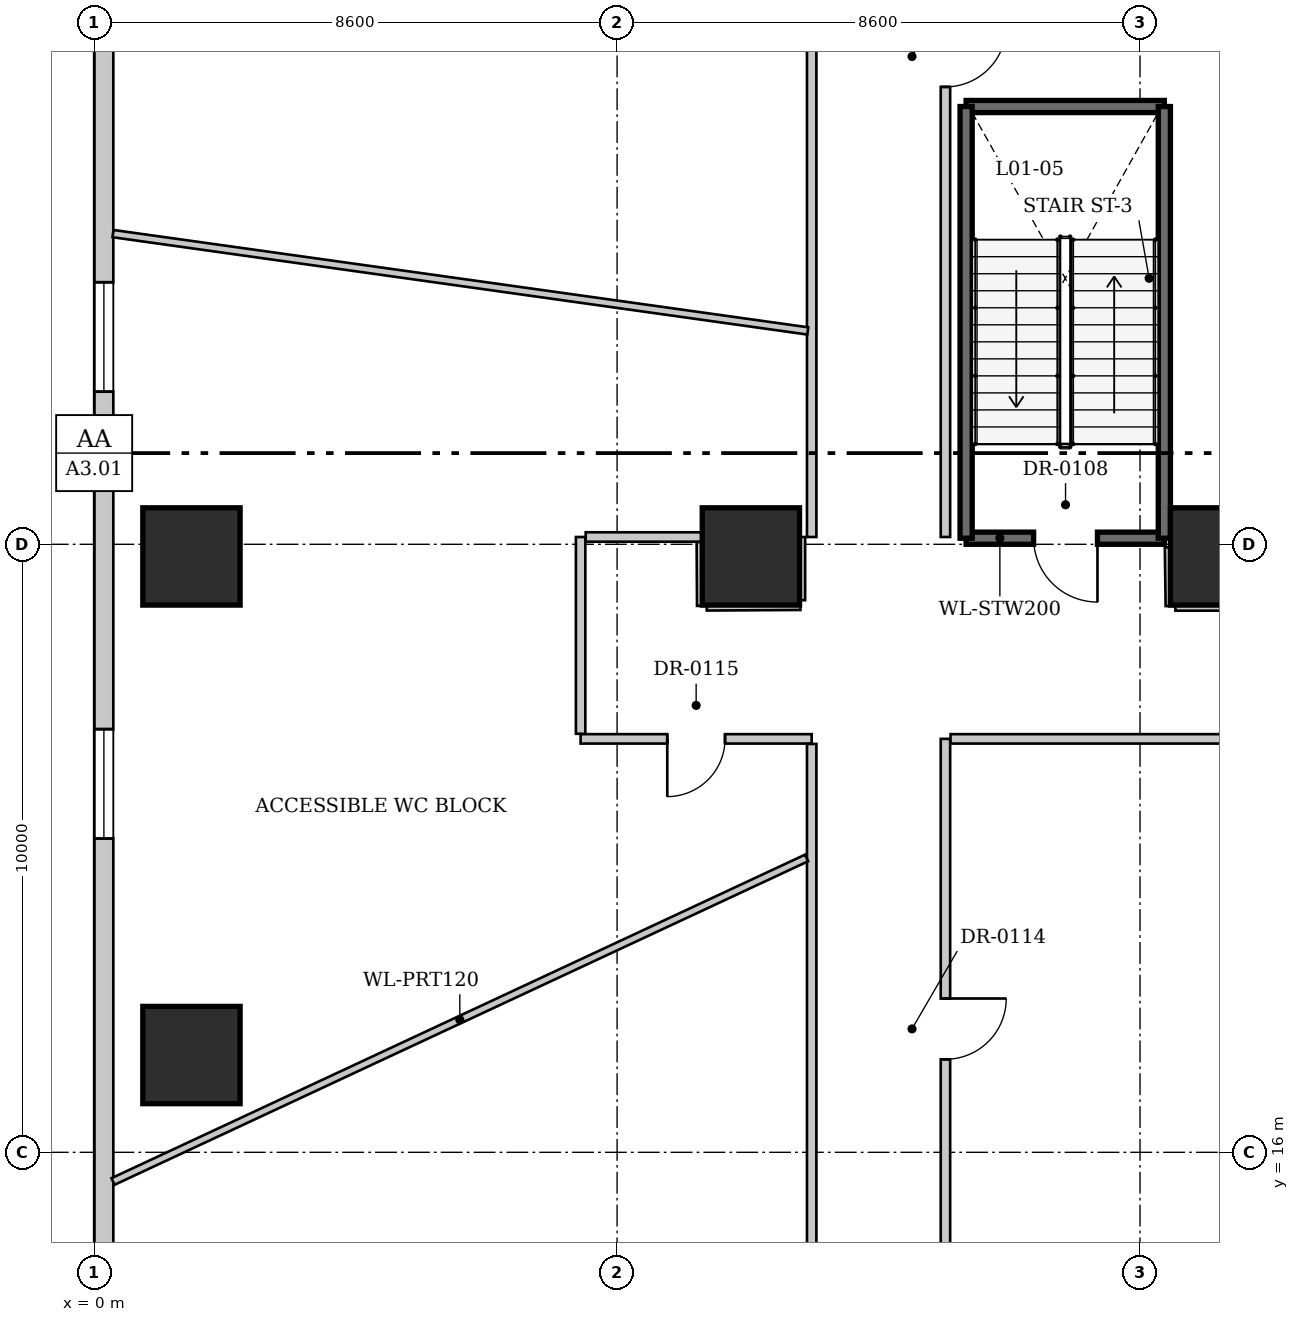
"""IFC4 building model, lengths in metres.
Left out: names, types, materials, properties, quantities, classifications, styles, units other than length and angle.
Written with IfcOpenShell. Run it as: python <this file> out.ifc"""

import sys

from ifc_helpers import new_model, si_unit, direction, frame, frame_2d, origin, origin_2d, place, context, subcontext, project, spatial, rectangle, extrude, source, transform, mapped, element, fill, save


model = new_model("IFC4")
c1 = context("Model", 3, precision=1e-05, world=origin(), true_north=direction((0.0, 1.0)))
c2 = subcontext(c1, "Body", "Model", "MODEL_VIEW")
j1 = project(units=[si_unit("LENGTHUNIT", "METRE"), si_unit("PLANEANGLEUNIT", "RADIAN")], contexts=[c1])
p1 = place(None, origin())
s1 = spatial("IfcSite", under=j1, at=p1, CompositionType="ELEMENT")
p2 = place(p1, origin())
s2 = spatial("IfcBuilding", under=s1, at=p2, CompositionType="ELEMENT")
p3 = place(p2, frame((0.0, 0.0, 5.2)))
s3 = spatial("IfcBuildingStorey", under=s2, at=p3, CompositionType="ELEMENT", Elevation=5.2)
for number, where, z_axis, x_axis in (
    (1, (1.6, 17.6, 0.0), (0.0, 0.0, 1.0), (1.0, 0.0, 0.0)),
    (2, (1.6, 25.8, 0.0), (0.0, 0.0, 1.0), (1.0, 0.0, 0.0)),
    (3, (10.8, 25.8, 0.0), (0.0, 0.0, 1.0), (1.0, 0.0, 0.0)),
    (4, (18.5, 25.8, 0.0), (0.0, 0.0, 1.0), (1.0, 0.0, 0.0)),
):
    element("IfcColumn", number, at=place(p3, frame(where, z_axis=z_axis, x_axis=x_axis)), inside=s3, PredefinedType="COLUMN", context=c2, shape_type="SweptSolid", body=[
        extrude(rectangle(XDim=1.6, YDim=1.6, at=origin_2d()), origin(), (0.0, 0.0, 1.0), 4.3),
    ])
p4 = place(p3, frame((0.16, 8.16, 0.0), z_axis=(0.0, 0.0, 1.0), x_axis=(0.0, 1.0, 0.0)))
e5 = element("IfcWall", 5, at=p4, inside=s3, PredefinedType="SOLIDWALL", context=c2, shape_type="SweptSolid", body=[
    extrude(rectangle(XDim=39.68, YDim=0.31, at=frame_2d((19.84, 0.0))), origin(), (0.0, 0.0, 1.0), 4.05),
])
p5 = place(p4, frame((4.45, 0.0, 0.95)))
e6 = element("IfcOpeningElement", 6, at=p5, cuts=e5, PredefinedType="OPENING", context=c2, shape_type="SweptSolid", body=[
    extrude(rectangle(XDim=1.8, YDim=2.4, at=frame_2d((0.9, 1.2))), frame((0.0, 0.165, 0.0), z_axis=(0.0, -1.0, 0.0), x_axis=(1.0, 0.0, 0.0)), (0.0, 0.0, 1.0), 0.33),
])
p6 = place(p4, frame((13.0, 0.0, 0.95)))
e7 = element("IfcOpeningElement", 7, at=p6, cuts=e5, PredefinedType="OPENING", context=c2, shape_type="SweptSolid", body=[
    extrude(rectangle(XDim=1.8, YDim=2.4, at=frame_2d((0.9, 1.2))), frame((0.0, 0.165, 0.0), z_axis=(0.0, -1.0, 0.0), x_axis=(1.0, 0.0, 0.0)), (0.0, 0.0, 1.0), 0.33),
])
p7 = place(p4, frame((20.35, 0.0, 0.95)))
e8 = element("IfcOpeningElement", 8, at=p7, cuts=e5, PredefinedType="OPENING", context=c2, shape_type="SweptSolid", body=[
    extrude(rectangle(XDim=1.8, YDim=2.4, at=frame_2d((0.9, 1.2))), frame((0.0, 0.165, 0.0), z_axis=(0.0, -1.0, 0.0), x_axis=(1.0, 0.0, 0.0)), (0.0, 0.0, 1.0), 0.33),
])
p8 = place(p4, frame((31.0, 0.0, 0.95)))
e9 = element("IfcOpeningElement", 9, at=p8, cuts=e5, PredefinedType="OPENING", context=c2, shape_type="SweptSolid", body=[
    extrude(rectangle(XDim=1.8, YDim=2.4, at=frame_2d((0.9, 1.2))), frame((0.0, 0.165, 0.0), z_axis=(0.0, -1.0, 0.0), x_axis=(1.0, 0.0, 0.0)), (0.0, 0.0, 1.0), 0.33),
])
p9 = place(p3, frame((17.6, 26.1, 0.0), z_axis=(0.0, 0.0, 1.0), x_axis=(-1.0, 0.0, 0.0)))
e10 = element("IfcWall", 10, at=p9, inside=s3, PredefinedType="SHEAR", context=c2, shape_type="SweptSolid", body=[
    extrude(rectangle(XDim=3.26, YDim=0.2, at=frame_2d((1.63, 0.0))), origin(), (0.0, 0.0, 1.0), 4.6),
])
p10 = place(p9, frame((1.1, 0.0, 0.0)))
e11 = element("IfcOpeningElement", 11, at=p10, cuts=e10, PredefinedType="OPENING", context=c2, shape_type="SweptSolid", body=[
    extrude(rectangle(XDim=1.05, YDim=2.15, at=frame_2d((0.525, 1.075))), frame((0.0, 0.11, 0.0), z_axis=(0.0, -1.0, 0.0), x_axis=(1.0, 0.0, 0.0)), (0.0, 0.0, 1.0), 0.22),
])
p11 = place(p3, frame((14.34, 33.2, 0.0), z_axis=(0.0, 0.0, 1.0), x_axis=(1.0, 0.0, 0.0)))
e12 = element("IfcWall", 12, at=p11, inside=s3, PredefinedType="SHEAR", context=c2, shape_type="SweptSolid", body=[
    extrude(rectangle(XDim=3.26, YDim=0.2, at=frame_2d((1.63, 0.0))), origin(), (0.0, 0.0, 1.0), 4.6),
])
for number, where, z_axis, x_axis in (
    (13, (14.34, 26.1, 0.0), (0.0, 0.0, 1.0), (0.0, 1.0, 0.0)),
    (14, (17.6, 26.1, 0.0), (0.0, 0.0, 1.0), (0.0, 1.0, 0.0)),
):
    element("IfcWall", number, at=place(p3, frame(where, z_axis=z_axis, x_axis=x_axis)), inside=s3, PredefinedType="SHEAR", context=c2, shape_type="SweptSolid", body=[
        extrude(rectangle(XDim=7.1, YDim=0.2, at=frame_2d((3.55, 0.0))), origin(), (0.0, 0.0, 1.0), 4.6),
    ])
p12 = place(p3, frame((14.0, 22.8, 0.0), z_axis=(0.0, 0.0, 1.0), x_axis=(0.0, -1.0, 0.0)))
e15 = element("IfcWall", 15, at=p12, inside=s3, PredefinedType="PARTITIONING", context=c2, shape_type="SweptSolid", body=[
    extrude(rectangle(XDim=8.8, YDim=0.155, at=frame_2d((4.4, 0.0))), origin(), (0.0, 0.0, 1.0), 4.3),
])
p13 = place(p12, frame((4.271, 0.0, 0.0)))
e16 = element("IfcOpeningElement", 16, at=p13, cuts=e15, PredefinedType="OPENING", context=c2, shape_type="SweptSolid", body=[
    extrude(rectangle(XDim=1.0, YDim=2.15, at=frame_2d((0.5, 1.075))), frame((0.0, 0.087, 0.0), z_axis=(0.0, -1.0, 0.0), x_axis=(1.0, 0.0, 0.0)), (0.0, 0.0, 1.0), 0.175),
])
p14 = place(p3, frame((11.8, 22.8, 0.0), z_axis=(0.0, 0.0, 1.0), x_axis=(-1.0, 0.0, 0.0)))
e17 = element("IfcWall", 17, at=p14, inside=s3, PredefinedType="PARTITIONING", context=c2, shape_type="SweptSolid", body=[
    extrude(rectangle(XDim=3.8, YDim=0.155, at=frame_2d((1.9, 0.0))), origin(), (0.0, 0.0, 1.0), 4.3),
])
p15 = place(p14, frame((1.425, 0.0, 0.0)))
e18 = element("IfcOpeningElement", 18, at=p15, cuts=e17, PredefinedType="OPENING", context=c2, shape_type="SweptSolid", body=[
    extrude(rectangle(XDim=0.95, YDim=2.15, at=frame_2d((0.475, 1.075))), frame((0.0, 0.087, 0.0), z_axis=(0.0, -1.0, 0.0), x_axis=(1.0, 0.0, 0.0)), (0.0, 0.0, 1.0), 0.175),
])
p16 = place(p3, frame((14.0, 39.0, 0.0), z_axis=(0.0, 0.0, 1.0), x_axis=(0.0, -1.0, 0.0)))
e19 = element("IfcWall", 19, at=p16, inside=s3, PredefinedType="PARTITIONING", context=c2, shape_type="SweptSolid", body=[
    extrude(rectangle(XDim=12.88, YDim=0.155, at=frame_2d((6.44, 0.0))), origin(), (0.0, 0.0, 1.0), 4.3),
])
p17 = place(p16, frame((4.477, 0.0, 0.0)))
e20 = element("IfcOpeningElement", 20, at=p17, cuts=e19, PredefinedType="OPENING", context=c2, shape_type="SweptSolid", body=[
    extrude(rectangle(XDim=1.0, YDim=2.15, at=frame_2d((0.5, 1.075))), frame((0.0, 0.087, 0.0), z_axis=(0.0, -1.0, 0.0), x_axis=(1.0, 0.0, 0.0)), (0.0, 0.0, 1.0), 0.175),
])
p18 = place(p3, frame((32.717, 22.8, 0.0), z_axis=(0.0, 0.0, 1.0), x_axis=(-1.0, 0.0, 0.0)))
e21 = element("IfcWall", 21, at=p18, inside=s3, PredefinedType="PARTITIONING", context=c2, shape_type="SweptSolid", body=[
    extrude(rectangle(XDim=18.633, YDim=0.155, at=frame_2d((9.316, 0.0))), origin(), (0.0, 0.0, 1.0), 4.3),
])
p19 = place(p3, frame((11.8, 14.083, 0.0), z_axis=(0.0, 0.0, 1.0), x_axis=(0.0, 1.0, 0.0)))
e22 = element("IfcWall", 22, at=p19, inside=s3, PredefinedType="PARTITIONING", context=c2, shape_type="SweptSolid", body=[
    extrude(rectangle(XDim=8.633, YDim=0.155, at=frame_2d((4.316, 0.0))), origin(), (0.0, 0.0, 1.0), 4.3),
])
p20 = place(p3, frame((8.0, 22.884, 0.0), z_axis=(0.0, 0.0, 1.0), x_axis=(0.0, 1.0, 0.0)))
e23 = element("IfcWall", 23, at=p20, inside=s3, PredefinedType="PARTITIONING", context=c2, shape_type="SweptSolid", body=[
    extrude(rectangle(XDim=3.237, YDim=0.155, at=frame_2d((1.618, 0.0))), origin(), (0.0, 0.0, 1.0), 4.3),
])
p21 = place(p3, frame((8.083, 26.12, 0.0), z_axis=(0.0, 0.0, 1.0), x_axis=(1.0, 0.0, 0.0)))
e24 = element("IfcWall", 24, at=p21, inside=s3, PredefinedType="PARTITIONING", context=c2, shape_type="SweptSolid", body=[
    extrude(rectangle(XDim=1.902, YDim=0.155, at=frame_2d((0.951, 0.0))), origin(), (0.0, 0.0, 1.0), 4.3),
])
p22 = place(p3, frame((9.986, 26.037, 0.0), z_axis=(0.0, 0.0, 1.0), x_axis=(0.005817914102, -0.999983075795, 0.0)))
e25 = element("IfcWall", 25, at=p22, inside=s3, PredefinedType="PARTITIONING", context=c2, shape_type="SweptSolid", body=[
    extrude(rectangle(XDim=1.049, YDim=0.155, at=frame_2d((0.524, 0.0))), origin(), (0.0, 0.0, 1.0), 4.3),
])
p23 = place(p3, frame((10.075, 24.988, 0.0), z_axis=(0.0, 0.0, 1.0), x_axis=(0.99998278709, 0.005867326851, 0.0)))
e26 = element("IfcWall", 26, at=p23, inside=s3, PredefinedType="PARTITIONING", context=c2, shape_type="SweptSolid", body=[
    extrude(rectangle(XDim=1.54, YDim=0.155, at=frame_2d((0.77, 0.0))), origin(), (0.0, 0.0, 1.0), 4.3),
])
p24 = place(p3, frame((11.615, 25.081, 0.0), z_axis=(0.0, 0.0, 1.0), x_axis=(0.000234852037, 0.999999972422, 0.0)))
e27 = element("IfcWall", 27, at=p24, inside=s3, PredefinedType="PARTITIONING", context=c2, shape_type="SweptSolid", body=[
    extrude(rectangle(XDim=1.04, YDim=0.155, at=frame_2d((0.52, 0.0))), origin(), (0.0, 0.0, 1.0), 4.3),
])
p25 = place(p3, frame((11.8, 26.12, 0.0), z_axis=(0.0, 0.0, 1.0), x_axis=(0.0, 1.0, 0.0)))
e28 = element("IfcWall", 28, at=p25, inside=s3, PredefinedType="PARTITIONING", context=c2, shape_type="SweptSolid", body=[
    extrude(rectangle(XDim=12.88, YDim=0.155, at=frame_2d((6.44, 0.0))), origin(), (0.0, 0.0, 1.0), 4.3),
])
p26 = place(p3, frame((17.685, 25.95, 0.0), z_axis=(0.0, 0.0, 1.0), x_axis=(0.013915656501, -0.999903172564, 0.0)))
e29 = element("IfcWall", 29, at=p26, inside=s3, PredefinedType="PARTITIONING", context=c2, shape_type="SweptSolid", body=[
    extrude(rectangle(XDim=0.965, YDim=0.155, at=frame_2d((0.482, 0.0))), origin(), (0.0, 0.0, 1.0), 4.3),
])
p27 = place(p3, frame((17.782, 24.985, 0.0), z_axis=(0.0, 0.0, 1.0), x_axis=(0.999999372198, 0.001120537155, 0.0)))
e30 = element("IfcWall", 30, at=p27, inside=s3, PredefinedType="PARTITIONING", context=c2, shape_type="SweptSolid", body=[
    extrude(rectangle(XDim=1.525, YDim=0.155, at=frame_2d((0.763, 0.0))), origin(), (0.0, 0.0, 1.0), 4.3),
])
p28 = place(p3, frame((11.717, 20.841, 0.0), z_axis=(0.0, 0.0, 1.0), x_axis=(-0.906243586835, -0.422755912225, 0.0)))
e31 = element("IfcWall", 31, at=p28, inside=s3, PredefinedType="PARTITIONING", context=c2, shape_type="SweptSolid", body=[
    extrude(rectangle(XDim=12.587, YDim=0.12, at=frame_2d((6.293, 0.0))), origin(), (0.0, 0.0, 1.0), 4.3),
])
p29 = place(p3, frame((0.31, 31.11, 0.0), z_axis=(0.0, 0.0, 1.0), x_axis=(0.990323897966, -0.138775275601, 0.0)))
e32 = element("IfcWall", 32, at=p29, inside=s3, PredefinedType="PARTITIONING", context=c2, shape_type="SweptSolid", body=[
    extrude(rectangle(XDim=11.537, YDim=0.12, at=frame_2d((5.769, 0.0))), origin(), (0.0, 0.0, 1.0), 4.3),
])
m1 = source(origin(), c2, "Body", "SweptSolid", [
    extrude(rectangle(XDim=1.8, YDim=2.4, at=frame_2d((0.9, 1.2))), frame((0.0, 0.03, 0.0), z_axis=(0.0, -1.0, 0.0), x_axis=(1.0, 0.0, 0.0)), (0.0, 0.0, 1.0), 0.06),
])
p30 = place(p6, origin())
e33 = element("IfcWindow", 33, at=p30, inside=s3, PartitioningType="SINGLE_PANEL", PredefinedType="WINDOW", context=c2, shape_type="MappedRepresentation", body=[
    mapped(m1, transform((0.0, 0.0, 0.0), x_axis=(1.0, 0.0, 0.0), y_axis=(0.0, 1.0, 0.0), z_axis=(0.0, 0.0, 1.0), scale=1.0)),
])
fill(e7, e33)
p31 = place(p7, origin())
e34 = element("IfcWindow", 34, at=p31, inside=s3, PartitioningType="SINGLE_PANEL", PredefinedType="WINDOW", context=c2, shape_type="MappedRepresentation", body=[
    mapped(m1, transform((0.0, 0.0, 0.0), x_axis=(1.0, 0.0, 0.0), y_axis=(0.0, 1.0, 0.0), z_axis=(0.0, 0.0, 1.0), scale=1.0)),
])
fill(e8, e34)
m2 = source(origin(), c2, "Body", "SweptSolid", [
    extrude(rectangle(XDim=1.05, YDim=2.15, at=frame_2d((0.525, 1.075))), frame((0.0, 0.025, 0.0), z_axis=(0.0, -1.0, 0.0), x_axis=(1.0, 0.0, 0.0)), (0.0, 0.0, 1.0), 0.05),
])
p32 = place(p10, origin())
e35 = element("IfcDoor", 35, at=p32, inside=s3, OperationType="SINGLE_SWING_LEFT", PredefinedType="DOOR", context=c2, shape_type="MappedRepresentation", body=[
    mapped(m2, transform((0.0, 0.0, 0.0), x_axis=(1.0, 0.0, 0.0), y_axis=(0.0, 1.0, 0.0), z_axis=(0.0, 0.0, 1.0), scale=1.0)),
])
fill(e11, e35)
m3 = source(origin(), c2, "Body", "SweptSolid", [
    extrude(rectangle(XDim=1.0, YDim=2.15, at=frame_2d((0.5, 1.075))), frame((0.0, 0.025, 0.0), z_axis=(0.0, -1.0, 0.0), x_axis=(1.0, 0.0, 0.0)), (0.0, 0.0, 1.0), 0.05),
])
p33 = place(p13, origin())
e36 = element("IfcDoor", 36, at=p33, inside=s3, OperationType="SINGLE_SWING_LEFT", PredefinedType="DOOR", context=c2, shape_type="MappedRepresentation", body=[
    mapped(m3, transform((0.0, 0.0, 0.0), x_axis=(1.0, 0.0, 0.0), y_axis=(0.0, 1.0, 0.0), z_axis=(0.0, 0.0, 1.0), scale=1.0)),
])
fill(e16, e36)
m4 = source(origin(), c2, "Body", "SweptSolid", [
    extrude(rectangle(XDim=0.95, YDim=2.15, at=frame_2d((0.475, 1.075))), frame((0.0, 0.025, 0.0), z_axis=(0.0, -1.0, 0.0), x_axis=(1.0, 0.0, 0.0)), (0.0, 0.0, 1.0), 0.05),
])
p34 = place(p15, origin())
e37 = element("IfcDoor", 37, at=p34, inside=s3, OperationType="SINGLE_SWING_RIGHT", PredefinedType="DOOR", context=c2, shape_type="MappedRepresentation", body=[
    mapped(m4, transform((0.0, 0.0, 0.0), x_axis=(1.0, 0.0, 0.0), y_axis=(0.0, 1.0, 0.0), z_axis=(0.0, 0.0, 1.0), scale=1.0)),
])
fill(e18, e37)
p35 = place(p17, origin())
e38 = element("IfcDoor", 38, at=p35, inside=s3, OperationType="SINGLE_SWING_LEFT", PredefinedType="DOOR", context=c2, shape_type="MappedRepresentation", body=[
    mapped(m3, transform((0.0, 0.0, 0.0), x_axis=(1.0, 0.0, 0.0), y_axis=(0.0, 1.0, 0.0), z_axis=(0.0, 0.0, 1.0), scale=1.0)),
])
fill(e20, e38)
save(model, sys.argv[1])
